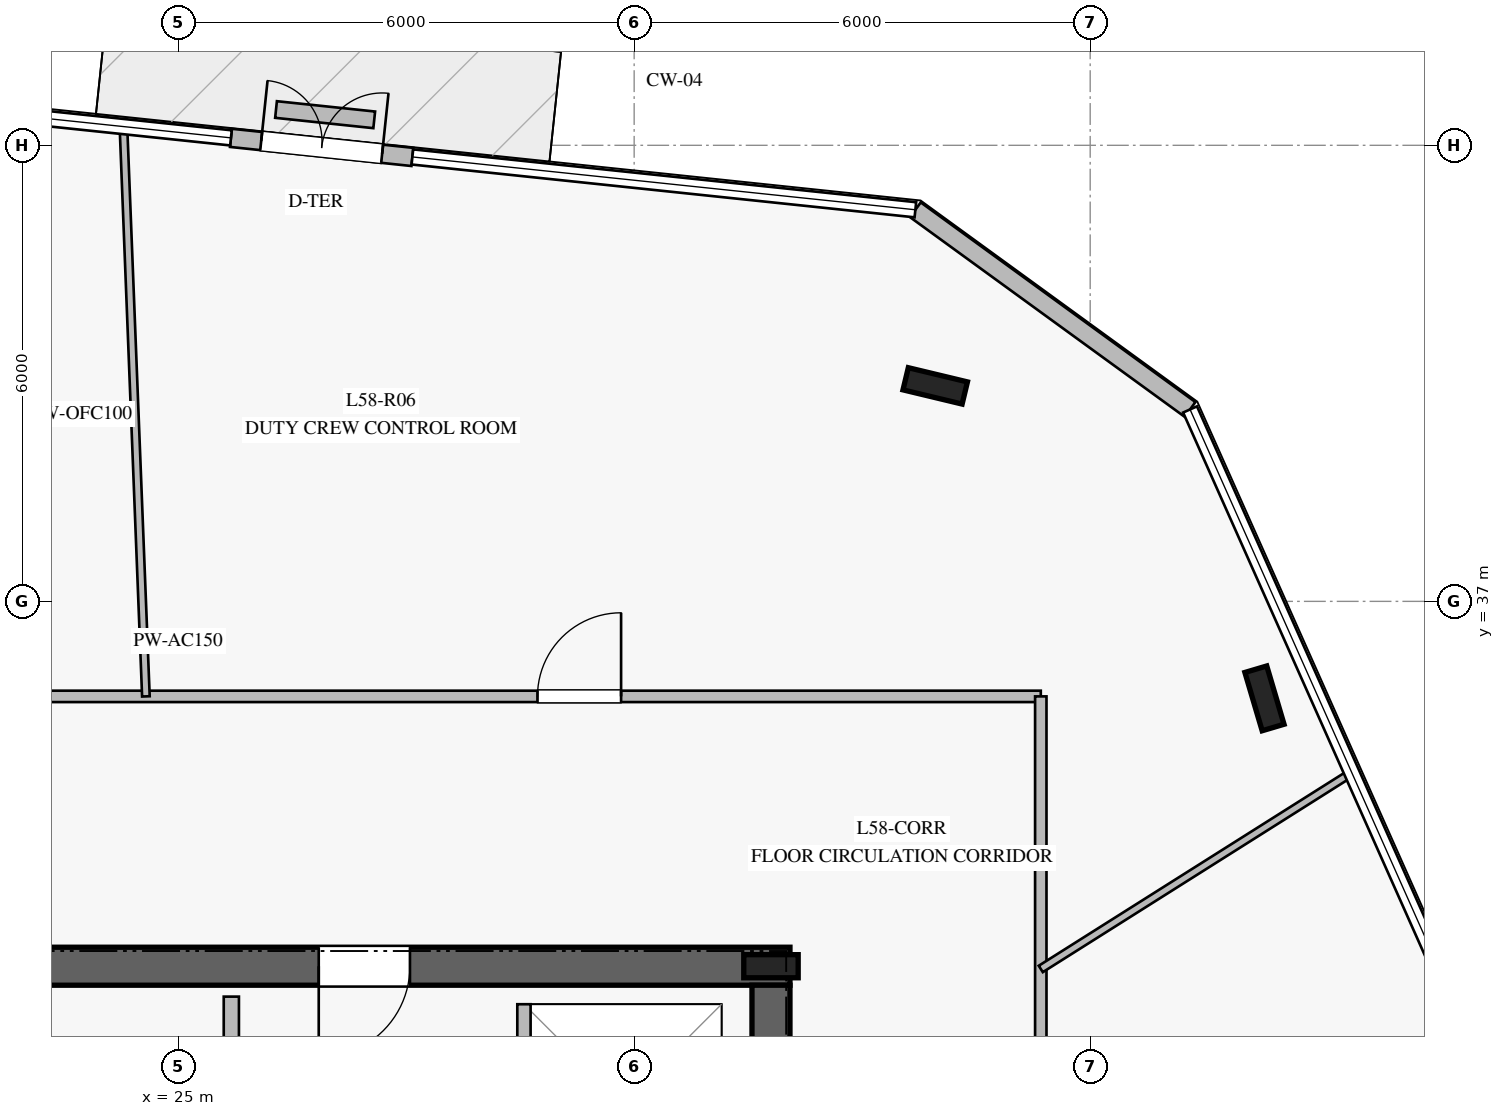
"""IFC4 building model, lengths in metres.
Left out: names, types, materials, properties, quantities, classifications, styles, units other than length and angle.
Written with IfcOpenShell. Run it as: python <this file> out.ifc"""

import sys

from ifc_helpers import new_model, si_unit, direction, frame, frame_2d, origin, origin_2d, place, context, subcontext, project, spatial, rectangle, i_section, extrude, element, fill, save


model = new_model("IFC4")
c1 = context("Model", 3, precision=1e-05, world=origin(), true_north=direction((0.0, 1.0)))
c2 = subcontext(c1, "Body", "Model", "MODEL_VIEW")
j1 = project(units=[si_unit("LENGTHUNIT", "METRE"), si_unit("PLANEANGLEUNIT", "RADIAN")], contexts=[c1])
p1 = place(None, origin())
s1 = spatial("IfcSite", under=j1, at=p1, CompositionType="ELEMENT")
p2 = place(p1, origin())
s2 = spatial("IfcBuilding", under=s1, at=p2, CompositionType="ELEMENT")
p3 = place(p2, frame((0.0, 0.0, 240.8)))
s3 = spatial("IfcBuildingStorey", under=s2, at=p3, CompositionType="ELEMENT", Elevation=240.8)
p4 = place(p3, frame((33.05, 32.2, 0.0), z_axis=(0.0, 0.0, 1.0), x_axis=(-1.0, 0.0, 0.0)))
e1 = element("IfcWall", 1, at=p4, inside=s3, PredefinedType="SHEAR", context=c2, shape_type="SweptSolid", body=[
    extrude(rectangle(XDim=16.1, YDim=0.5, at=frame_2d((8.05, 0.0))), origin(), (0.0, 0.0, 1.0), 3.7),
])
p5 = place(p4, frame((5.0, 0.0, 0.0)))
e2 = element("IfcOpeningElement", 2, at=p5, cuts=e1, PredefinedType="OPENING", context=c2, shape_type="SweptSolid", body=[
    extrude(rectangle(XDim=1.2, YDim=2.25, at=frame_2d((0.6, 1.125))), frame((0.0, 0.26, 0.0), z_axis=(0.0, -1.0, 0.0), x_axis=(1.0, 0.0, 0.0)), (0.0, 0.0, 1.0), 0.52),
])
p6 = place(p4, frame((9.825, 0.0, 0.0)))
e3 = element("IfcOpeningElement", 3, at=p6, cuts=e1, PredefinedType="OPENING", context=c2, shape_type="SweptSolid", body=[
    extrude(rectangle(XDim=1.1, YDim=2.2, at=frame_2d((0.55, 1.1))), frame((0.0, 0.26, 0.0), z_axis=(0.0, -1.0, 0.0), x_axis=(1.0, 0.0, 0.0)), (0.0, 0.0, 1.0), 0.52),
])
p7 = place(p3, frame((32.8, 18.05, 0.0), z_axis=(0.0, 0.0, 1.0), x_axis=(0.0, 1.0, 0.0)))
e4 = element("IfcWall", 4, at=p7, inside=s3, PredefinedType="SHEAR", context=c2, shape_type="SweptSolid", body=[
    extrude(rectangle(XDim=13.9, YDim=0.5, at=frame_2d((6.95, 0.0))), origin(), (0.0, 0.0, 1.0), 3.7),
])
p8 = place(p3, frame((32.8, 32.2, 0.0), z_axis=(0.0, 0.0, 1.0), x_axis=(1.0, 0.0, 0.0)))
e5 = element("IfcColumn", 5, at=p8, inside=s3, PredefinedType="COLUMN", context=c2, shape_type="SweptSolid", body=[
    extrude(i_section(OverallWidth=0.304, OverallDepth=0.716, WebThickness=0.021, FlangeThickness=0.04, at=origin_2d()), origin(), (0.0, 0.0, 1.0), 4.0),
])
for number, where, z_axis, x_axis in (
    (6, (34.961, 39.835, 0.0), (0.0, 0.0, 1.0), (-0.972, 0.233, 0.0)),
    (7, (39.293, 35.724, 0.0), (0.0, 0.0, 1.0), (-0.284, 0.959, 0.0)),
):
    element("IfcColumn", number, at=place(p3, frame(where, z_axis=z_axis, x_axis=x_axis)), inside=s3, PredefinedType="COLUMN", context=c2, shape_type="SweptSolid", body=[
        extrude(i_section(OverallWidth=0.3, OverallDepth=0.8, WebThickness=0.018, FlangeThickness=0.033, at=origin_2d()), origin(), (0.0, 0.0, 1.0), 4.0),
    ])
p9 = place(p3, frame((28.082, 42.847, 0.0), z_axis=(0.0, 0.0, 1.0), x_axis=(-0.994517708252, 0.10456829335, 0.0)))
e8 = element("IfcWall", 8, at=p9, inside=s3, PredefinedType="STANDARD", context=c2, shape_type="SweptSolid", body=[
    extrude(rectangle(XDim=2.4, YDim=0.24, at=frame_2d((1.2, 0.0))), origin(), (0.0, 0.0, 1.0), 3.7),
])
p10 = place(p9, frame((0.4, 0.0, 0.0)))
e9 = element("IfcOpeningElement", 9, at=p10, cuts=e8, PredefinedType="OPENING", context=c2, shape_type="SweptSolid", body=[
    extrude(rectangle(XDim=1.6, YDim=2.25, at=frame_2d((0.8, 1.125))), frame((0.0, 0.13, 0.0), z_axis=(0.0, -1.0, 0.0), x_axis=(1.0, 0.0, 0.0)), (0.0, 0.0, 1.0), 0.26),
])
p11 = place(p3, frame((38.314, 39.525, 0.0), z_axis=(0.0, 0.0, 1.0), x_axis=(-0.808861298874, 0.587999489102, 0.0)))
e10 = element("IfcWall", 10, at=p11, inside=s3, PredefinedType="STANDARD", context=c2, shape_type="SweptSolid", body=[
    extrude(rectangle(XDim=4.468, YDim=0.24, at=frame_2d((2.234, 0.0))), origin(), (0.0, 0.0, 1.0), 3.7),
])
p12 = place(p3, frame((27.58, 43.335, 0.0), z_axis=(0.0, 0.0, 1.0), x_axis=(-0.994506482607, 0.104675002043, 0.0)))
e11 = element("IfcWall", 11, at=p12, inside=s3, PredefinedType="USERDEFINED", context=c2, shape_type="SweptSolid", body=[
    extrude(rectangle(XDim=1.299, YDim=0.22, at=frame_2d((0.649, 0.0))), origin(), (0.0, 0.0, 1.0), 0.4),
])
p13 = place(p3, frame((25.7, 26.65, 0.0), z_axis=(0.0, 0.0, 1.0), x_axis=(0.0, 1.0, 0.0)))
e12 = element("IfcWall", 12, at=p13, inside=s3, PredefinedType="PARTITIONING", context=c2, shape_type="SweptSolid", body=[
    extrude(rectangle(XDim=5.15, YDim=0.2, at=frame_2d((2.575, 0.0))), origin(), (0.0, 0.0, 1.0), 3.7),
])
p14 = place(p3, frame((29.55, 29.1, 0.0), z_axis=(0.0, 0.0, 1.0), x_axis=(0.0, 1.0, 0.0)))
e13 = element("IfcWall", 13, at=p14, inside=s3, PredefinedType="PARTITIONING", context=c2, shape_type="SweptSolid", body=[
    extrude(rectangle(XDim=2.6, YDim=0.175, at=frame_2d((1.3, 0.0))), origin(), (0.0, 0.0, 1.0), 3.7),
])
p15 = place(p14, frame((0.7, 0.0, 0.0)))
e14 = element("IfcOpeningElement", 14, at=p15, cuts=e13, PredefinedType="OPENING", context=c2, shape_type="SweptSolid", body=[
    extrude(rectangle(XDim=1.2, YDim=2.2, at=frame_2d((0.6, 1.1))), frame((0.0, 0.098, 0.0), z_axis=(0.0, -1.0, 0.0), x_axis=(1.0, 0.0, 0.0)), (0.0, 0.0, 1.0), 0.195),
])
p16 = place(p3, frame((13.65, 35.75, 0.0), z_axis=(0.0, 0.0, 1.0), x_axis=(1.0, 0.0, 0.0)))
e15 = element("IfcWall", 15, at=p16, inside=s3, PredefinedType="PARTITIONING", context=c2, shape_type="SweptSolid", body=[
    extrude(rectangle(XDim=22.7, YDim=0.15, at=frame_2d((11.35, 0.0))), origin(), (0.0, 0.0, 1.0), 3.2),
])
p17 = place(p16, frame((16.078, 0.0, 0.0)))
e16 = element("IfcOpeningElement", 16, at=p17, cuts=e15, PredefinedType="OPENING", context=c2, shape_type="SweptSolid", body=[
    extrude(rectangle(XDim=1.1, YDim=2.2, at=frame_2d((0.55, 1.1))), frame((0.0, 0.085, 0.0), z_axis=(0.0, -1.0, 0.0), x_axis=(1.0, 0.0, 0.0)), (0.0, 0.0, 1.0), 0.17),
])
p18 = place(p16, frame((5.75, 0.0, 0.0)))
e17 = element("IfcOpeningElement", 17, at=p18, cuts=e15, PredefinedType="OPENING", context=c2, shape_type="SweptSolid", body=[
    extrude(rectangle(XDim=1.1, YDim=2.2, at=frame_2d((0.55, 1.1))), frame((0.0, 0.085, 0.0), z_axis=(0.0, -1.0, 0.0), x_axis=(1.0, 0.0, 0.0)), (0.0, 0.0, 1.0), 0.17),
])
p19 = place(p3, frame((36.35, 35.75, 0.0), z_axis=(0.0, 0.0, 1.0), x_axis=(0.0, -1.0, 0.0)))
e18 = element("IfcWall", 18, at=p19, inside=s3, PredefinedType="PARTITIONING", context=c2, shape_type="SweptSolid", body=[
    extrude(rectangle(XDim=21.5, YDim=0.15, at=frame_2d((10.75, 0.0))), origin(), (0.0, 0.0, 1.0), 3.2),
])
p20 = place(p19, frame((17.905, 0.0, 0.0)))
e19 = element("IfcOpeningElement", 19, at=p20, cuts=e18, PredefinedType="OPENING", context=c2, shape_type="SweptSolid", body=[
    extrude(rectangle(XDim=1.1, YDim=2.2, at=frame_2d((0.55, 1.1))), frame((0.0, 0.085, 0.0), z_axis=(0.0, -1.0, 0.0), x_axis=(1.0, 0.0, 0.0)), (0.0, 0.0, 1.0), 0.17),
])
p21 = place(p19, frame((9.193, 0.0, 0.0)))
e20 = element("IfcOpeningElement", 20, at=p21, cuts=e18, PredefinedType="OPENING", context=c2, shape_type="SweptSolid", body=[
    extrude(rectangle(XDim=1.1, YDim=2.2, at=frame_2d((0.55, 1.1))), frame((0.0, 0.085, 0.0), z_axis=(0.0, -1.0, 0.0), x_axis=(1.0, 0.0, 0.0)), (0.0, 0.0, 1.0), 0.17),
])
p22 = place(p3, frame((24.576, 35.75, 0.0), z_axis=(0.0, 0.0, 1.0), x_axis=(-0.03939754968, 0.999223615153, 0.0)))
e21 = element("IfcWall", 21, at=p22, inside=s3, PredefinedType="MOVABLE", context=c2, shape_type="SweptSolid", body=[
    extrude(rectangle(XDim=7.486, YDim=0.1, at=frame_2d((3.743, 0.0))), origin(), (0.0, 0.0, 1.0), 3.1),
])
p23 = place(p3, frame((36.35, 32.164, 0.0), z_axis=(0.0, 0.0, 1.0), x_axis=(0.845632033333, 0.53376630111, 0.0)))
e22 = element("IfcWall", 22, at=p23, inside=s3, PredefinedType="MOVABLE", context=c2, shape_type="SweptSolid", body=[
    extrude(rectangle(XDim=4.822, YDim=0.1, at=frame_2d((2.411, 0.0))), origin(), (0.0, 0.0, 1.0), 3.1),
])
p24 = place(p10, frame((1.6, 0.0, 0.0), z_axis=(0.0, 0.0, 1.0), x_axis=(-1.0, 0.0, 0.0)))
e23 = element("IfcDoor", 23, at=p24, inside=s3, OperationType="DOUBLE_DOOR_SINGLE_SWING", PredefinedType="DOOR", context=c2, shape_type="SweptSolid", body=[
    extrude(rectangle(XDim=1.6, YDim=2.25, at=frame_2d((0.8, 1.125))), frame((0.0, 0.025, 0.0), z_axis=(0.0, -1.0, 0.0), x_axis=(1.0, 0.0, 0.0)), (0.0, 0.0, 1.0), 0.05),
])
fill(e9, e23)
p25 = place(p5, origin())
e24 = element("IfcDoor", 24, at=p25, inside=s3, OperationType="SINGLE_SWING_RIGHT", PredefinedType="DOOR", context=c2, shape_type="SweptSolid", body=[
    extrude(rectangle(XDim=1.2, YDim=2.25, at=frame_2d((0.6, 1.125))), frame((0.0, 0.025, 0.0), z_axis=(0.0, -1.0, 0.0), x_axis=(1.0, 0.0, 0.0)), (0.0, 0.0, 1.0), 0.05),
])
fill(e2, e24)
p26 = place(p17, origin())
e25 = element("IfcDoor", 25, at=p26, inside=s3, OperationType="SINGLE_SWING_RIGHT", PredefinedType="DOOR", context=c2, shape_type="SweptSolid", body=[
    extrude(rectangle(XDim=1.1, YDim=2.2, at=frame_2d((0.55, 1.1))), frame((0.0, 0.025, 0.0), z_axis=(0.0, -1.0, 0.0), x_axis=(1.0, 0.0, 0.0)), (0.0, 0.0, 1.0), 0.05),
])
fill(e16, e25)
save(model, sys.argv[1])
